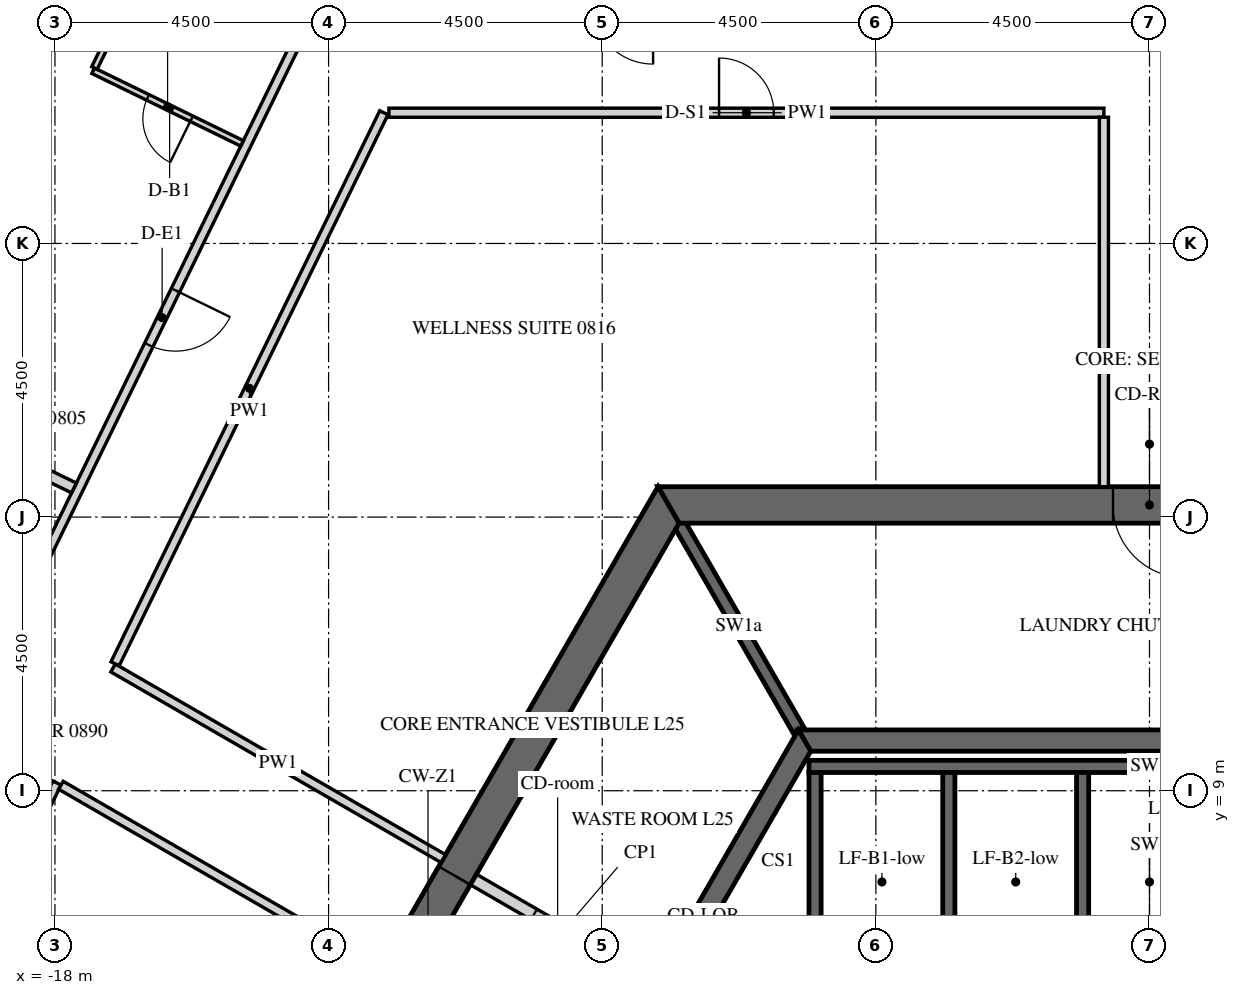
"""IFC4 building model, lengths in metres.
Left out: names, types, materials, properties, quantities, classifications, styles, units other than length and angle.
Written with IfcOpenShell. Run it as: python <this file> out.ifc"""

import sys

from ifc_helpers import new_model, si_unit, direction, frame, frame_2d, origin, place, context, subcontext, project, spatial, polyline, rectangle, outline, extrude, element, fill, save


model = new_model("IFC4")
c1 = context("Model", 3, precision=1e-05, world=origin(), true_north=direction((0.0, 1.0)))
c2 = subcontext(c1, "Body", "Model", "MODEL_VIEW")
j1 = project(units=[si_unit("LENGTHUNIT", "METRE"), si_unit("PLANEANGLEUNIT", "RADIAN")], contexts=[c1])
p1 = place(None, origin())
s1 = spatial("IfcSite", under=j1, at=p1, CompositionType="ELEMENT")
p2 = place(p1, origin())
s2 = spatial("IfcBuilding", under=s1, at=p2, CompositionType="ELEMENT")
p3 = place(p2, frame((0.0, 0.0, 111.6)))
s3 = spatial("IfcBuildingStorey", under=s2, at=p3, CompositionType="ELEMENT", Elevation=111.6)
p4 = place(p3, frame((-7.91, 13.7, -0.15), z_axis=(0.0, 0.0, 1.0), x_axis=(-0.499999880136, -0.866025472988, 0.0)))
e1 = element("IfcWall", 1, at=p4, inside=s3, PredefinedType="SHEAR", context=c2, shape_type="SweptSolid", body=[
    extrude(outline(polyline([(-0.173, -0.3), (15.993, -0.3), (15.646, 0.3), (0.173, 0.3), (-0.173, -0.3)])), origin(), (0.0, 0.0, 1.0), 3.9),
])
p5 = place(p4, frame((7.039, 0.0, 0.15)))
e2 = element("IfcOpeningElement", 2, at=p5, cuts=e1, PredefinedType="OPENING", context=c2, shape_type="SweptSolid", body=[
    extrude(rectangle(XDim=1.8, YDim=2.4, at=frame_2d((0.9, 1.2))), frame((0.0, 0.31, 0.0), z_axis=(0.0, -1.0, 0.0), x_axis=(1.0, 0.0, 0.0)), (0.0, 0.0, 1.0), 0.62),
])
p6 = place(p3, frame((7.91, 13.7, -0.15), z_axis=(0.0, 0.0, 1.0), x_axis=(-1.0, 0.0, 0.0)))
e3 = element("IfcWall", 3, at=p6, inside=s3, PredefinedType="SHEAR", context=c2, shape_type="SweptSolid", body=[
    extrude(outline(polyline([(-0.173, -0.3), (15.993, -0.3), (15.646, 0.3), (0.173, 0.3), (-0.173, -0.3)])), origin(), (0.0, 0.0, 1.0), 3.9),
])
p7 = place(p6, frame((7.31, 0.0, 0.15)))
e4 = element("IfcOpeningElement", 4, at=p7, cuts=e3, PredefinedType="OPENING", context=c2, shape_type="SweptSolid", body=[
    extrude(rectangle(XDim=1.2, YDim=2.4, at=frame_2d((0.6, 1.2))), frame((0.0, 0.31, 0.0), z_axis=(0.0, -1.0, 0.0), x_axis=(1.0, 0.0, 0.0)), (0.0, 0.0, 1.0), 0.62),
])
p8 = place(p3, frame((-5.673, 9.825, -0.15), z_axis=(0.0, 0.0, 1.0), x_axis=(-0.499995046907, -0.866028263435, 0.0)))
e5 = element("IfcWall", 5, at=p8, inside=s3, PredefinedType="SHEAR", context=c2, shape_type="SweptSolid", body=[
    extrude(outline(polyline([(-0.101, -0.175), (11.446, -0.175), (11.244, 0.175), (0.101, 0.175), (-0.101, -0.175)])), origin(), (0.0, 0.0, 1.0), 3.9),
])
p9 = place(p8, frame((4.801, 0.0, 0.15)))
e6 = element("IfcOpeningElement", 6, at=p9, cuts=e5, PredefinedType="OPENING", context=c2, shape_type="SweptSolid", body=[
    extrude(rectangle(XDim=1.8, YDim=2.4, at=frame_2d((0.9, 1.2))), frame((0.0, 0.185, 0.0), z_axis=(0.0, -1.0, 0.0), x_axis=(1.0, 0.0, 0.0)), (0.0, 0.0, 1.0), 0.37),
])
p10 = place(p3, frame((5.673, 9.825, -0.15), z_axis=(0.0, 0.0, 1.0), x_axis=(-1.0, 0.0, 0.0)))
e7 = element("IfcWall", 7, at=p10, inside=s3, PredefinedType="SHEAR", context=c2, shape_type="SweptSolid", body=[
    extrude(outline(polyline([(-0.101, -0.175), (11.446, -0.175), (11.244, 0.175), (0.101, 0.175), (-0.101, -0.175)])), origin(), (0.0, 0.0, 1.0), 3.9),
])
p11 = place(p3, frame((-5.6, 9.4, -0.25), z_axis=(0.0, 0.0, 1.0), x_axis=(1.0, 0.0, 0.0)))
e8 = element("IfcWall", 8, at=p11, inside=s3, PredefinedType="SHEAR", context=c2, shape_type="SweptSolid", body=[
    extrude(rectangle(XDim=11.2, YDim=0.2, at=frame_2d((5.6, 0.0))), origin(), (0.0, 0.0, 1.0), 3.9),
])
for number, where, z_axis, x_axis in (
    (9, (-5.5, 6.4, -0.25), (0.0, 0.0, 1.0), (0.0, 1.0, 0.0)),
    (10, (-3.3, 6.4, -0.25), (0.0, 0.0, 1.0), (0.0, 1.0, 0.0)),
    (11, (-1.1, 6.4, -0.25), (0.0, 0.0, 1.0), (0.0, 1.0, 0.0)),
):
    element("IfcWall", number, at=place(p3, frame(where, z_axis=z_axis, x_axis=x_axis)), inside=s3, PredefinedType="SHEAR", context=c2, shape_type="SweptSolid", body=[
        extrude(rectangle(XDim=2.9, YDim=0.2, at=frame_2d((1.45, 0.0))), origin(), (0.0, 0.0, 1.0), 3.9),
    ])
p12 = place(p3, frame((-5.773, 10.0, -0.15), z_axis=(0.0, 0.0, 1.0), x_axis=(-0.500038251005, 0.86600331843, 0.0)))
e12 = element("IfcWall", 12, at=p12, inside=s3, PredefinedType="SHEAR", context=c2, shape_type="SweptSolid", body=[
    extrude(rectangle(XDim=3.926, YDim=0.2, at=frame_2d((1.963, 0.0))), origin(), (0.0, 0.0, 1.0), 3.9),
])
p13 = place(p3, frame((-8.175, 5.841, 0.0), z_axis=(0.0, 0.0, 1.0), x_axis=(-0.866020560687, 0.500008388397, 0.0)))
e13 = element("IfcWall", 13, at=p13, inside=s3, PredefinedType="PARTITIONING", context=c2, shape_type="SweptSolid", body=[
    extrude(rectangle(XDim=3.4, YDim=0.2, at=frame_2d((1.7, 0.0))), origin(), (0.0, 0.0, 1.0), 3.65),
])
p14 = place(p13, frame((1.35, 0.0, 0.0)))
e14 = element("IfcOpeningElement", 14, at=p14, cuts=e13, PredefinedType="OPENING", context=c2, shape_type="SweptSolid", body=[
    extrude(rectangle(XDim=0.9, YDim=2.1, at=frame_2d((0.45, 1.05))), frame((0.0, 0.11, 0.0), z_axis=(0.0, -1.0, 0.0), x_axis=(1.0, 0.0, 0.0)), (0.0, 0.0, 1.0), 0.22),
])
p15 = place(p3, frame((-13.752, 21.875, 0.0), z_axis=(0.0, 0.0, 1.0), x_axis=(-0.438376846054, -0.898791266559, 0.0)))
e15 = element("IfcWall", 15, at=p15, inside=s3, PredefinedType="PARTITIONING", context=c2, shape_type="SweptSolid", body=[
    extrude(rectangle(XDim=22.002, YDim=0.15, at=frame_2d((11.001, 0.0))), origin(), (0.0, 0.0, 1.0), 2.988),
])
p16 = place(p15, frame((5.169, 0.0, 0.0)))
e16 = element("IfcOpeningElement", 16, at=p16, cuts=e15, PredefinedType="OPENING", context=c2, shape_type="SweptSolid", body=[
    extrude(rectangle(XDim=1.0, YDim=2.1, at=frame_2d((0.5, 1.05))), frame((0.0, 0.085, 0.0), z_axis=(0.0, -1.0, 0.0), x_axis=(1.0, 0.0, 0.0)), (0.0, 0.0, 1.0), 0.17),
])
p17 = place(p15, frame((16.112, 0.0, 0.0)))
e17 = element("IfcOpeningElement", 17, at=p17, cuts=e15, PredefinedType="OPENING", context=c2, shape_type="SweptSolid", body=[
    extrude(rectangle(XDim=1.0, YDim=2.1, at=frame_2d((0.5, 1.05))), frame((0.0, 0.085, 0.0), z_axis=(0.0, -1.0, 0.0), x_axis=(1.0, 0.0, 0.0)), (0.0, 0.0, 1.0), 0.17),
])
p18 = place(p3, frame((-11.614, 7.884, 0.0), z_axis=(0.0, 0.0, 1.0), x_axis=(-0.866025438137, 0.4999999405, 0.0)))
e18 = element("IfcWall", 18, at=p18, inside=s3, PredefinedType="PARTITIONING", context=c2, shape_type="SweptSolid", body=[
    extrude(rectangle(XDim=6.271, YDim=0.15, at=frame_2d((3.135, 0.0))), origin(), (0.0, 0.0, 1.0), 2.988),
])
p19 = place(p3, frame((-17.011, 11.087, 0.0), z_axis=(0.0, 0.0, 1.0), x_axis=(0.43836877185, 0.898795204631, 0.0)))
e19 = element("IfcWall", 19, at=p19, inside=s3, PredefinedType="PARTITIONING", context=c2, shape_type="SweptSolid", body=[
    extrude(rectangle(XDim=10.083, YDim=0.15, at=frame_2d((5.042, 0.0))), origin(), (0.0, 0.0, 1.0), 2.988),
])
p20 = place(p3, frame((-12.508, 20.15, 0.0), z_axis=(0.0, 0.0, 1.0), x_axis=(1.0, 0.0, 0.0)))
e20 = element("IfcWall", 20, at=p20, inside=s3, PredefinedType="PARTITIONING", context=c2, shape_type="SweptSolid", body=[
    extrude(rectangle(XDim=11.758, YDim=0.15, at=frame_2d((5.879, 0.0))), origin(), (0.0, 0.0, 1.0), 2.988),
])
p21 = place(p20, frame((5.429, 0.0, 0.0)))
e21 = element("IfcOpeningElement", 21, at=p21, cuts=e20, PredefinedType="OPENING", context=c2, shape_type="SweptSolid", body=[
    extrude(rectangle(XDim=0.9, YDim=2.1, at=frame_2d((0.45, 1.05))), frame((0.0, 0.085, 0.0), z_axis=(0.0, -1.0, 0.0), x_axis=(1.0, 0.0, 0.0)), (0.0, 0.0, 1.0), 0.17),
])
p22 = place(p3, frame((-0.75, 20.075, 0.0), z_axis=(0.0, 0.0, 1.0), x_axis=(0.0, -1.0, 0.0)))
e22 = element("IfcWall", 22, at=p22, inside=s3, PredefinedType="PARTITIONING", context=c2, shape_type="SweptSolid", body=[
    extrude(rectangle(XDim=6.075, YDim=0.15, at=frame_2d((3.038, 0.0))), origin(), (0.0, 0.0, 1.0), 2.988),
])
p23 = place(p3, frame((-22.219, 0.41, 0.0), z_axis=(0.0, 0.0, 1.0), x_axis=(0.438391891827, 0.898783927972, 0.0)))
e23 = element("IfcWall", 23, at=p23, inside=s3, PredefinedType="PARTITIONING", context=c2, shape_type="SweptSolid", body=[
    extrude(rectangle(XDim=9.699, YDim=0.15, at=frame_2d((4.85, 0.0))), origin(), (0.0, 0.0, 1.0), 2.988),
])
p24 = place(p23, frame((4.4, 0.0, 0.0)))
e24 = element("IfcOpeningElement", 24, at=p24, cuts=e23, PredefinedType="OPENING", context=c2, shape_type="SweptSolid", body=[
    extrude(rectangle(XDim=0.9, YDim=2.1, at=frame_2d((0.45, 1.05))), frame((0.0, 0.085, 0.0), z_axis=(0.0, -1.0, 0.0), x_axis=(1.0, 0.0, 0.0)), (0.0, 0.0, 1.0), 0.17),
])
p25 = place(p3, frame((-17.902, 9.09, 0.0), z_axis=(0.0, 0.0, 1.0), x_axis=(0.866036368755, -0.499981007633, 0.0)))
e25 = element("IfcWall", 25, at=p25, inside=s3, PredefinedType="PARTITIONING", context=c2, shape_type="SweptSolid", body=[
    extrude(rectangle(XDim=6.049, YDim=0.15, at=frame_2d((3.024, 0.0))), origin(), (0.0, 0.0, 1.0), 2.988),
])
p26 = place(p3, frame((-14.923, 19.646, 0.0), z_axis=(0.0, 0.0, 1.0), x_axis=(-0.898791692788, 0.43837597217, 0.0)))
e26 = element("IfcWall", 26, at=p26, inside=s3, PredefinedType="PARTITIONING", context=c2, shape_type="SweptSolid", body=[
    extrude(rectangle(XDim=2.725, YDim=0.1, at=frame_2d((1.363, 0.0))), origin(), (0.0, 0.0, 1.0), 2.988),
])
p27 = place(p26, frame((0.925, 0.0, 0.0)))
e27 = element("IfcOpeningElement", 27, at=p27, cuts=e26, PredefinedType="OPENING", context=c2, shape_type="SweptSolid", body=[
    extrude(rectangle(XDim=0.8, YDim=2.1, at=frame_2d((0.4, 1.05))), frame((0.0, 0.06, 0.0), z_axis=(0.0, -1.0, 0.0), x_axis=(1.0, 0.0, 0.0)), (0.0, 0.0, 1.0), 0.12),
])
p28 = place(p3, frame((-17.35, 20.885, 0.0), z_axis=(0.0, 0.0, 1.0), x_axis=(0.438384020656, 0.898787767181, 0.0)))
e28 = element("IfcWall", 28, at=p28, inside=s3, PredefinedType="PARTITIONING", context=c2, shape_type="SweptSolid", body=[
    extrude(rectangle(XDim=2.55, YDim=0.1, at=frame_2d((1.275, 0.0))), origin(), (0.0, 0.0, 1.0), 2.988),
])
p29 = place(p3, frame((-24.36, 17.234, 0.0), z_axis=(0.0, 0.0, 1.0), x_axis=(0.898796252669, -0.438366623032, 0.0)))
e29 = element("IfcWall", 29, at=p29, inside=s3, PredefinedType="PARTITIONING", context=c2, shape_type="SweptSolid", body=[
    extrude(rectangle(XDim=7.425, YDim=0.18, at=frame_2d((3.712, 0.0))), origin(), (0.0, 0.0, 1.0), 2.988),
])
p30 = place(p5, origin())
e30 = element("IfcDoor", 30, at=p30, inside=s3, OperationType="DOUBLE_DOOR_SINGLE_SWING", PredefinedType="DOOR", context=c2, shape_type="SweptSolid", body=[
    extrude(rectangle(XDim=1.8, YDim=2.4, at=frame_2d((0.9, 1.2))), frame((0.0, 0.025, 0.0), z_axis=(0.0, -1.0, 0.0), x_axis=(1.0, 0.0, 0.0)), (0.0, 0.0, 1.0), 0.05),
])
fill(e2, e30)
p31 = place(p7, origin())
e31 = element("IfcDoor", 31, at=p31, inside=s3, OperationType="SINGLE_SWING_LEFT", PredefinedType="DOOR", context=c2, shape_type="SweptSolid", body=[
    extrude(rectangle(XDim=1.2, YDim=2.4, at=frame_2d((0.6, 1.2))), frame((0.0, 0.025, 0.0), z_axis=(0.0, -1.0, 0.0), x_axis=(1.0, 0.0, 0.0)), (0.0, 0.0, 1.0), 0.05),
])
fill(e4, e31)
p32 = place(p14, origin())
e32 = element("IfcDoor", 32, at=p32, inside=s3, OperationType="SINGLE_SWING_LEFT", PredefinedType="DOOR", context=c2, shape_type="SweptSolid", body=[
    extrude(rectangle(XDim=0.9, YDim=2.1, at=frame_2d((0.45, 1.05))), frame((0.0, 0.025, 0.0), z_axis=(0.0, -1.0, 0.0), x_axis=(1.0, 0.0, 0.0)), (0.0, 0.0, 1.0), 0.05),
])
fill(e14, e32)
p33 = place(p16, origin())
e33 = element("IfcDoor", 33, at=p33, inside=s3, OperationType="SINGLE_SWING_LEFT", PredefinedType="DOOR", context=c2, shape_type="SweptSolid", body=[
    extrude(rectangle(XDim=1.0, YDim=2.1, at=frame_2d((0.5, 1.05))), frame((0.0, 0.025, 0.0), z_axis=(0.0, -1.0, 0.0), x_axis=(1.0, 0.0, 0.0)), (0.0, 0.0, 1.0), 0.05),
])
fill(e16, e33)
p34 = place(p27, origin())
e34 = element("IfcDoor", 34, at=p34, inside=s3, OperationType="SINGLE_SWING_RIGHT", PredefinedType="DOOR", context=c2, shape_type="SweptSolid", body=[
    extrude(rectangle(XDim=0.8, YDim=2.1, at=frame_2d((0.4, 1.05))), frame((0.0, 0.025, 0.0), z_axis=(0.0, -1.0, 0.0), x_axis=(1.0, 0.0, 0.0)), (0.0, 0.0, 1.0), 0.05),
])
fill(e27, e34)
p35 = place(p21, origin())
e35 = element("IfcDoor", 35, at=p35, inside=s3, OperationType="SINGLE_SWING_RIGHT", PredefinedType="DOOR", context=c2, shape_type="SweptSolid", body=[
    extrude(rectangle(XDim=0.9, YDim=2.1, at=frame_2d((0.45, 1.05))), frame((0.0, 0.025, 0.0), z_axis=(0.0, -1.0, 0.0), x_axis=(1.0, 0.0, 0.0)), (0.0, 0.0, 1.0), 0.05),
])
fill(e21, e35)
save(model, sys.argv[1])
